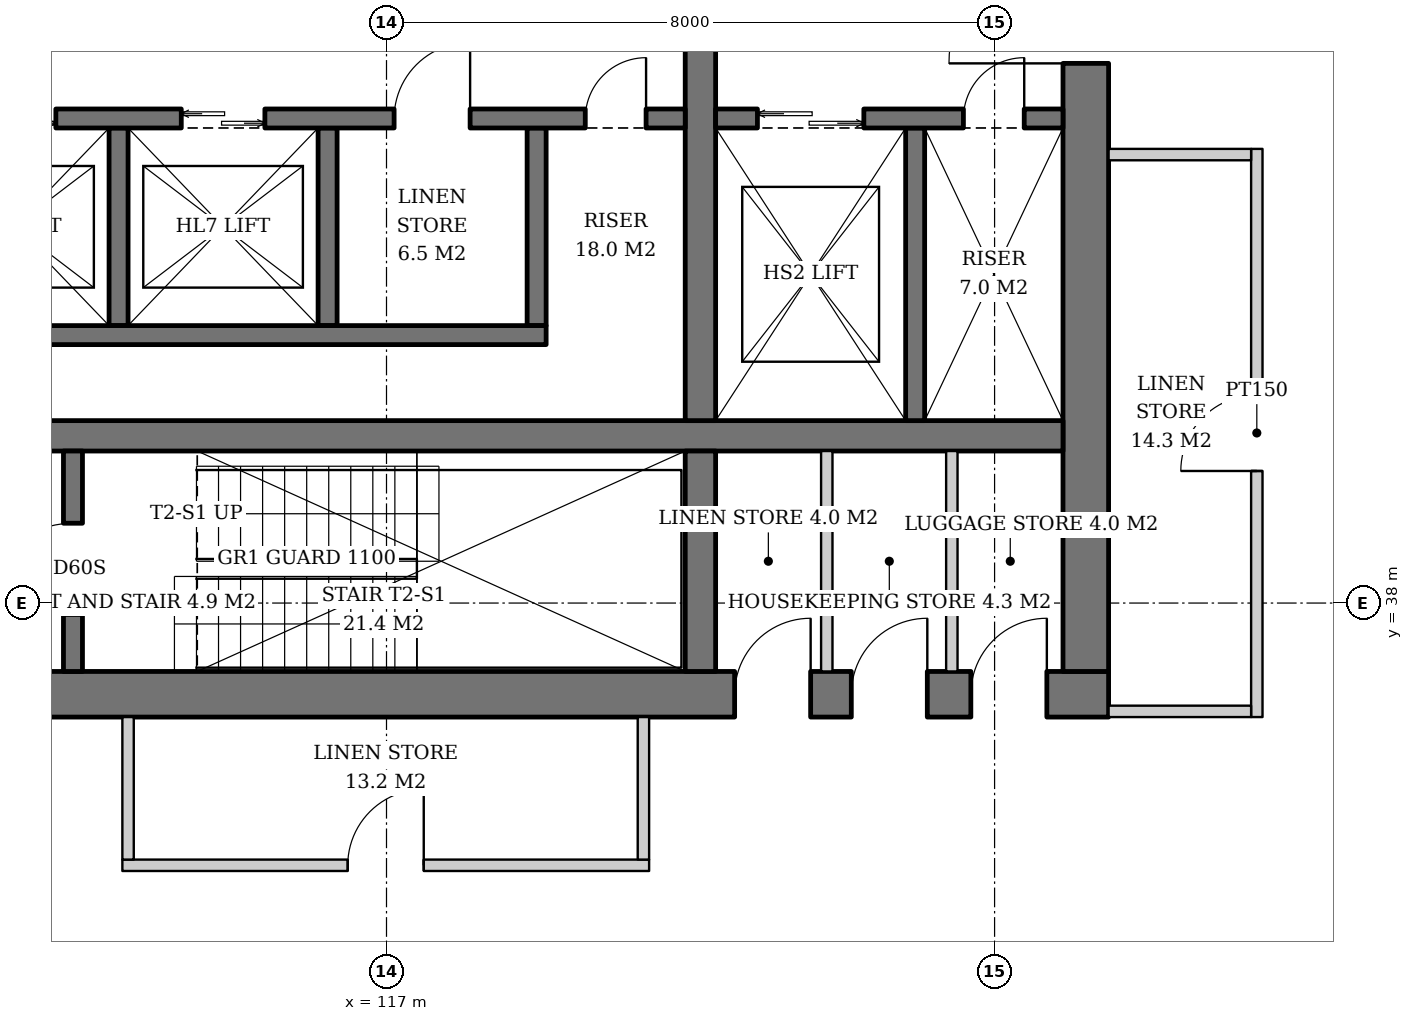
"""IFC4 building model, lengths in metres.
Left out: names, types, materials, properties, quantities, classifications, styles, units other than length and angle.
Written with IfcOpenShell. Run it as: python <this file> out.ifc"""

import sys

from ifc_helpers import new_model, si_unit, direction, frame, frame_2d, origin, place, context, subcontext, project, spatial, rectangle, extrude, element, fill, save


model = new_model("IFC4")
c1 = context("Model", 3, precision=1e-05, world=origin(), true_north=direction((0.0, 1.0)))
c2 = subcontext(c1, "Body", "Model", "MODEL_VIEW")
j1 = project(units=[si_unit("LENGTHUNIT", "METRE"), si_unit("PLANEANGLEUNIT", "RADIAN")], contexts=[c1])
p1 = place(None, origin())
s1 = spatial("IfcSite", under=j1, at=p1, CompositionType="ELEMENT")
p2 = place(p1, origin())
s2 = spatial("IfcBuilding", under=s1, at=p2, CompositionType="ELEMENT")
p3 = place(p2, frame((0.0, 0.0, 40.0)))
s3 = spatial("IfcBuildingStorey", under=s2, at=p3, CompositionType="ELEMENT", Elevation=40.0)
p4 = place(p3, frame((107.5, 36.8, 0.0), z_axis=(0.0, 0.0, 1.0), x_axis=(1.0, 0.0, 0.0)))
e1 = element("IfcWall", 1, at=p4, inside=s3, PredefinedType="SHEAR", context=c2, shape_type="SweptSolid", body=[
    extrude(rectangle(XDim=19.0, YDim=0.6, at=frame_2d((9.5, 0.0))), origin(), (0.0, 0.0, 1.0), 3.8),
])
p5 = place(p4, frame((3.9, 0.0, 0.0)))
e2 = element("IfcOpeningElement", 2, at=p5, cuts=e1, PredefinedType="OPENING", context=c2, shape_type="SweptSolid", body=[
    extrude(rectangle(XDim=1.0, YDim=2.1, at=frame_2d((0.5, 1.05))), frame((0.0, 0.31, 0.0), z_axis=(0.0, -1.0, 0.0), x_axis=(1.0, 0.0, 0.0)), (0.0, 0.0, 1.0), 0.62),
])
p6 = place(p4, frame((14.08, 0.0, 0.0)))
e3 = element("IfcOpeningElement", 3, at=p6, cuts=e1, PredefinedType="OPENING", context=c2, shape_type="SweptSolid", body=[
    extrude(rectangle(XDim=1.0, YDim=2.1, at=frame_2d((0.5, 1.05))), frame((0.0, 0.31, 0.0), z_axis=(0.0, -1.0, 0.0), x_axis=(1.0, 0.0, 0.0)), (0.0, 0.0, 1.0), 0.62),
])
p7 = place(p4, frame((15.615, 0.0, 0.0)))
e4 = element("IfcOpeningElement", 4, at=p7, cuts=e1, PredefinedType="OPENING", context=c2, shape_type="SweptSolid", body=[
    extrude(rectangle(XDim=1.0, YDim=2.1, at=frame_2d((0.5, 1.05))), frame((0.0, 0.31, 0.0), z_axis=(0.0, -1.0, 0.0), x_axis=(1.0, 0.0, 0.0)), (0.0, 0.0, 1.0), 0.62),
])
p8 = place(p4, frame((17.188, 0.0, 0.0)))
e5 = element("IfcOpeningElement", 5, at=p8, cuts=e1, PredefinedType="OPENING", context=c2, shape_type="SweptSolid", body=[
    extrude(rectangle(XDim=1.0, YDim=2.1, at=frame_2d((0.5, 1.05))), frame((0.0, 0.31, 0.0), z_axis=(0.0, -1.0, 0.0), x_axis=(1.0, 0.0, 0.0)), (0.0, 0.0, 1.0), 0.62),
])
p9 = place(p3, frame((126.2, 37.1, 0.0), z_axis=(0.0, 0.0, 1.0), x_axis=(0.0, 1.0, 0.0)))
e6 = element("IfcWall", 6, at=p9, inside=s3, PredefinedType="SHEAR", context=c2, shape_type="SweptSolid", body=[
    extrude(rectangle(XDim=17.8, YDim=0.6, at=frame_2d((8.9, 0.0))), origin(), (0.0, 0.0, 1.0), 3.8),
])
p10 = place(p9, frame((8.0, 0.0, 0.0)))
e7 = element("IfcOpeningElement", 7, at=p10, cuts=e6, PredefinedType="OPENING", context=c2, shape_type="SweptSolid", body=[
    extrude(rectangle(XDim=1.8, YDim=2.4, at=frame_2d((0.9, 1.2))), frame((0.0, 0.31, 0.0), z_axis=(0.0, -1.0, 0.0), x_axis=(1.0, 0.0, 0.0)), (0.0, 0.0, 1.0), 0.62),
])
p11 = place(p3, frame((108.1, 40.2, 0.0), z_axis=(0.0, 0.0, 1.0), x_axis=(1.0, 0.0, 0.0)))
e8 = element("IfcWall", 8, at=p11, inside=s3, PredefinedType="SHEAR", context=c2, shape_type="SweptSolid", body=[
    extrude(rectangle(XDim=17.8, YDim=0.4, at=frame_2d((8.9, 0.0))), origin(), (0.0, 0.0, 1.0), 3.8),
])
p12 = place(p3, frame((121.13, 37.1, 0.0), z_axis=(0.0, 0.0, 1.0), x_axis=(0.0, 1.0, 0.0)))
e9 = element("IfcWall", 9, at=p12, inside=s3, PredefinedType="SHEAR", context=c2, shape_type="SweptSolid", body=[
    extrude(rectangle(XDim=2.9, YDim=0.4, at=frame_2d((1.45, 0.0))), origin(), (0.0, 0.0, 1.0), 3.8),
])
p13 = place(p3, frame((121.13, 40.4, 0.0), z_axis=(0.0, 0.0, 1.0), x_axis=(0.0, 1.0, 0.0)))
e10 = element("IfcWall", 10, at=p13, inside=s3, PredefinedType="SHEAR", context=c2, shape_type="SweptSolid", body=[
    extrude(rectangle(XDim=11.2, YDim=0.4, at=frame_2d((5.6, 0.0))), origin(), (0.0, 0.0, 1.0), 3.8),
])
p14 = place(p3, frame((112.875, 37.1, 0.0), z_axis=(0.0, 0.0, 1.0), x_axis=(0.0, 1.0, 0.0)))
e11 = element("IfcWall", 11, at=p14, inside=s3, PredefinedType="SHEAR", context=c2, shape_type="SweptSolid", body=[
    extrude(rectangle(XDim=2.9, YDim=0.25, at=frame_2d((1.45, 0.0))), origin(), (0.0, 0.0, 1.0), 3.8),
])
p15 = place(p14, frame((0.75, 0.0, 0.0)))
e12 = element("IfcOpeningElement", 12, at=p15, cuts=e11, PredefinedType="OPENING", context=c2, shape_type="SweptSolid", body=[
    extrude(rectangle(XDim=1.2, YDim=2.1, at=frame_2d((0.6, 1.05))), frame((0.0, 0.135, 0.0), z_axis=(0.0, -1.0, 0.0), x_axis=(1.0, 0.0, 0.0)), (0.0, 0.0, 1.0), 0.27),
])
for number, where, z_axis, x_axis in (
    (13, (113.475, 44.25, 0.0), (0.0, 0.0, 1.0), (0.0, -1.0, 0.0)),
    (14, (116.225, 44.25, 0.0), (0.0, 0.0, 1.0), (0.0, -1.0, 0.0)),
    (15, (118.975, 44.25, 0.0), (0.0, 0.0, 1.0), (0.0, -1.0, 0.0)),
):
    element("IfcWall", number, at=place(p3, frame(where, z_axis=z_axis, x_axis=x_axis)), inside=s3, PredefinedType="SHEAR", context=c2, shape_type="SweptSolid", body=[
        extrude(rectangle(XDim=2.6, YDim=0.25, at=frame_2d((1.3, 0.0))), origin(), (0.0, 0.0, 1.0), 3.8),
    ])
p16 = place(p3, frame((108.1, 41.525, 0.0), z_axis=(0.0, 0.0, 1.0), x_axis=(1.0, 0.0, 0.0)))
e16 = element("IfcWall", 16, at=p16, inside=s3, PredefinedType="SHEAR", context=c2, shape_type="SweptSolid", body=[
    extrude(rectangle(XDim=11.0, YDim=0.25, at=frame_2d((5.5, 0.0))), origin(), (0.0, 0.0, 1.0), 3.8),
])
p17 = place(p3, frame((108.1, 44.375, 0.0), z_axis=(0.0, 0.0, 1.0), x_axis=(1.0, 0.0, 0.0)))
e17 = element("IfcWall", 17, at=p17, inside=s3, PredefinedType="SHEAR", context=c2, shape_type="SweptSolid", body=[
    extrude(rectangle(XDim=12.83, YDim=0.25, at=frame_2d((6.415, 0.0))), origin(), (0.0, 0.0, 1.0), 3.8),
])
p18 = place(p17, frame((0.7, 0.0, 0.0)))
e18 = element("IfcOpeningElement", 18, at=p18, cuts=e17, PredefinedType="OPENING", context=c2, shape_type="SweptSolid", body=[
    extrude(rectangle(XDim=1.1, YDim=2.2, at=frame_2d((0.55, 1.1))), frame((0.0, 0.135, 0.0), z_axis=(0.0, -1.0, 0.0), x_axis=(1.0, 0.0, 0.0)), (0.0, 0.0, 1.0), 0.27),
])
p19 = place(p17, frame((3.45, 0.0, 0.0)))
e19 = element("IfcOpeningElement", 19, at=p19, cuts=e17, PredefinedType="OPENING", context=c2, shape_type="SweptSolid", body=[
    extrude(rectangle(XDim=1.1, YDim=2.2, at=frame_2d((0.55, 1.1))), frame((0.0, 0.135, 0.0), z_axis=(0.0, -1.0, 0.0), x_axis=(1.0, 0.0, 0.0)), (0.0, 0.0, 1.0), 0.27),
])
p20 = place(p17, frame((6.2, 0.0, 0.0)))
e20 = element("IfcOpeningElement", 20, at=p20, cuts=e17, PredefinedType="OPENING", context=c2, shape_type="SweptSolid", body=[
    extrude(rectangle(XDim=1.1, YDim=2.2, at=frame_2d((0.55, 1.1))), frame((0.0, 0.135, 0.0), z_axis=(0.0, -1.0, 0.0), x_axis=(1.0, 0.0, 0.0)), (0.0, 0.0, 1.0), 0.27),
])
p21 = place(p17, frame((9.0, 0.0, 0.0)))
e21 = element("IfcOpeningElement", 21, at=p21, cuts=e17, PredefinedType="OPENING", context=c2, shape_type="SweptSolid", body=[
    extrude(rectangle(XDim=1.0, YDim=2.1, at=frame_2d((0.5, 1.05))), frame((0.0, 0.135, 0.0), z_axis=(0.0, -1.0, 0.0), x_axis=(1.0, 0.0, 0.0)), (0.0, 0.0, 1.0), 0.27),
])
p22 = place(p17, frame((11.515, 0.0, 0.0)))
e22 = element("IfcOpeningElement", 22, at=p22, cuts=e17, PredefinedType="OPENING", context=c2, shape_type="SweptSolid", body=[
    extrude(rectangle(XDim=0.8, YDim=2.0, at=frame_2d((0.4, 1.0))), frame((0.0, 0.135, 0.0), z_axis=(0.0, -1.0, 0.0), x_axis=(1.0, 0.0, 0.0)), (0.0, 0.0, 1.0), 0.27),
])
p23 = place(p3, frame((123.955, 44.25, 0.0), z_axis=(0.0, 0.0, 1.0), x_axis=(0.0, -1.0, 0.0)))
e23 = element("IfcWall", 23, at=p23, inside=s3, PredefinedType="SHEAR", context=c2, shape_type="SweptSolid", body=[
    extrude(rectangle(XDim=3.85, YDim=0.25, at=frame_2d((1.925, 0.0))), origin(), (0.0, 0.0, 1.0), 3.8),
])
p24 = place(p3, frame((121.33, 44.375, 0.0), z_axis=(0.0, 0.0, 1.0), x_axis=(1.0, 0.0, 0.0)))
e24 = element("IfcWall", 24, at=p24, inside=s3, PredefinedType="SHEAR", context=c2, shape_type="SweptSolid", body=[
    extrude(rectangle(XDim=4.57, YDim=0.25, at=frame_2d((2.285, 0.0))), origin(), (0.0, 0.0, 1.0), 3.8),
])
p25 = place(p24, frame((0.55, 0.0, 0.0)))
e25 = element("IfcOpeningElement", 25, at=p25, cuts=e24, PredefinedType="OPENING", context=c2, shape_type="SweptSolid", body=[
    extrude(rectangle(XDim=1.4, YDim=2.4, at=frame_2d((0.7, 1.2))), frame((0.0, 0.135, 0.0), z_axis=(0.0, -1.0, 0.0), x_axis=(1.0, 0.0, 0.0)), (0.0, 0.0, 1.0), 0.27),
])
p26 = place(p24, frame((3.26, 0.0, 0.0)))
e26 = element("IfcOpeningElement", 26, at=p26, cuts=e24, PredefinedType="OPENING", context=c2, shape_type="SweptSolid", body=[
    extrude(rectangle(XDim=0.8, YDim=2.0, at=frame_2d((0.4, 1.0))), frame((0.0, 0.135, 0.0), z_axis=(0.0, -1.0, 0.0), x_axis=(1.0, 0.0, 0.0)), (0.0, 0.0, 1.0), 0.27),
])
for number, where, z_axis, x_axis in (
    (27, (122.792, 37.1, 0.0), (0.0, 0.0, 1.0), (0.0, 1.0, 0.0)),
    (28, (124.438, 37.1, 0.0), (0.0, 0.0, 1.0), (0.0, 1.0, 0.0)),
):
    element("IfcWall", number, at=place(p3, frame(where, z_axis=z_axis, x_axis=x_axis)), inside=s3, PredefinedType="SOLIDWALL", context=c2, shape_type="SweptSolid", body=[
        extrude(rectangle(XDim=2.9, YDim=0.15, at=frame_2d((1.45, 0.0))), origin(), (0.0, 0.0, 1.0), 3.6),
    ])
p27 = place(p3, frame((128.45, 36.5, 0.0), z_axis=(0.0, 0.0, 1.0), x_axis=(0.0, 1.0, 0.0)))
e29 = element("IfcWall", 29, at=p27, inside=s3, PredefinedType="PARTITIONING", context=c2, shape_type="SweptSolid", body=[
    extrude(rectangle(XDim=7.475, YDim=0.15, at=frame_2d((3.738, 0.0))), origin(), (0.0, 0.0, 1.0), 2.8),
])
p28 = place(p27, frame((3.238, 0.0, 0.0)))
e30 = element("IfcOpeningElement", 30, at=p28, cuts=e29, PredefinedType="OPENING", context=c2, shape_type="SweptSolid", body=[
    extrude(rectangle(XDim=1.0, YDim=2.1, at=frame_2d((0.5, 1.05))), frame((0.0, 0.085, 0.0), z_axis=(0.0, -1.0, 0.0), x_axis=(1.0, 0.0, 0.0)), (0.0, 0.0, 1.0), 0.17),
])
p29 = place(p3, frame((126.5, 36.575, 0.0), z_axis=(0.0, 0.0, 1.0), x_axis=(1.0, 0.0, 0.0)))
e31 = element("IfcWall", 31, at=p29, inside=s3, PredefinedType="PARTITIONING", context=c2, shape_type="SweptSolid", body=[
    extrude(rectangle(XDim=1.875, YDim=0.15, at=frame_2d((0.938, 0.0))), origin(), (0.0, 0.0, 1.0), 2.8),
])
p30 = place(p3, frame((126.5, 43.9, 0.0), z_axis=(0.0, 0.0, 1.0), x_axis=(1.0, 0.0, 0.0)))
e32 = element("IfcWall", 32, at=p30, inside=s3, PredefinedType="PARTITIONING", context=c2, shape_type="SweptSolid", body=[
    extrude(rectangle(XDim=1.875, YDim=0.15, at=frame_2d((0.938, 0.0))), origin(), (0.0, 0.0, 1.0), 3.6),
])
p31 = place(p3, frame((113.525, 34.55, 0.0), z_axis=(0.0, 0.0, 1.0), x_axis=(1.0, 0.0, 0.0)))
e33 = element("IfcWall", 33, at=p31, inside=s3, PredefinedType="PARTITIONING", context=c2, shape_type="SweptSolid", body=[
    extrude(rectangle(XDim=6.93, YDim=0.15, at=frame_2d((3.465, 0.0))), origin(), (0.0, 0.0, 1.0), 2.847),
])
p32 = place(p31, frame((2.965, 0.0, 0.0)))
e34 = element("IfcOpeningElement", 34, at=p32, cuts=e33, PredefinedType="OPENING", context=c2, shape_type="SweptSolid", body=[
    extrude(rectangle(XDim=1.0, YDim=2.1, at=frame_2d((0.5, 1.05))), frame((0.0, 0.085, 0.0), z_axis=(0.0, -1.0, 0.0), x_axis=(1.0, 0.0, 0.0)), (0.0, 0.0, 1.0), 0.17),
])
for number, where, z_axis, x_axis in (
    (35, (113.6, 36.5, 0.0), (0.0, 0.0, 1.0), (0.0, -1.0, 0.0)),
    (36, (120.38, 36.5, 0.0), (0.0, 0.0, 1.0), (0.0, -1.0, 0.0)),
):
    element("IfcWall", number, at=place(p3, frame(where, z_axis=z_axis, x_axis=x_axis)), inside=s3, PredefinedType="PARTITIONING", context=c2, shape_type="SweptSolid", body=[
        extrude(rectangle(XDim=1.875, YDim=0.15, at=frame_2d((0.938, 0.0))), origin(), (0.0, 0.0, 1.0), 3.6),
    ])
p33 = place(p15, origin())
e37 = element("IfcDoor", 37, at=p33, inside=s3, OperationType="SINGLE_SWING_LEFT", PredefinedType="DOOR", context=c2, shape_type="SweptSolid", body=[
    extrude(rectangle(XDim=1.2, YDim=2.1, at=frame_2d((0.6, 1.05))), frame((0.0, 0.025, 0.0), z_axis=(0.0, -1.0, 0.0), x_axis=(1.0, 0.0, 0.0)), (0.0, 0.0, 1.0), 0.05),
])
fill(e12, e37)
p34 = place(p19, origin())
e38 = element("IfcDoor", 38, at=p34, inside=s3, OperationType="DOUBLE_DOOR_SLIDING", PredefinedType="DOOR", context=c2, shape_type="SweptSolid", body=[
    extrude(rectangle(XDim=1.1, YDim=2.2, at=frame_2d((0.55, 1.1))), frame((0.0, 0.025, 0.0), z_axis=(0.0, -1.0, 0.0), x_axis=(1.0, 0.0, 0.0)), (0.0, 0.0, 1.0), 0.05),
])
fill(e19, e38)
p35 = place(p20, origin())
e39 = element("IfcDoor", 39, at=p35, inside=s3, OperationType="DOUBLE_DOOR_SLIDING", PredefinedType="DOOR", context=c2, shape_type="SweptSolid", body=[
    extrude(rectangle(XDim=1.1, YDim=2.2, at=frame_2d((0.55, 1.1))), frame((0.0, 0.025, 0.0), z_axis=(0.0, -1.0, 0.0), x_axis=(1.0, 0.0, 0.0)), (0.0, 0.0, 1.0), 0.05),
])
fill(e20, e39)
p36 = place(p21, origin())
e40 = element("IfcDoor", 40, at=p36, inside=s3, OperationType="SINGLE_SWING_RIGHT", PredefinedType="DOOR", context=c2, shape_type="SweptSolid", body=[
    extrude(rectangle(XDim=1.0, YDim=2.1, at=frame_2d((0.5, 1.05))), frame((0.0, 0.025, 0.0), z_axis=(0.0, -1.0, 0.0), x_axis=(1.0, 0.0, 0.0)), (0.0, 0.0, 1.0), 0.05),
])
fill(e21, e40)
p37 = place(p22, origin())
e41 = element("IfcDoor", 41, at=p37, inside=s3, OperationType="SINGLE_SWING_RIGHT", PredefinedType="DOOR", context=c2, shape_type="SweptSolid", body=[
    extrude(rectangle(XDim=0.8, YDim=2.0, at=frame_2d((0.4, 1.0))), frame((0.0, 0.025, 0.0), z_axis=(0.0, -1.0, 0.0), x_axis=(1.0, 0.0, 0.0)), (0.0, 0.0, 1.0), 0.05),
])
fill(e22, e41)
p38 = place(p25, origin())
e42 = element("IfcDoor", 42, at=p38, inside=s3, OperationType="DOUBLE_DOOR_SLIDING", PredefinedType="DOOR", context=c2, shape_type="SweptSolid", body=[
    extrude(rectangle(XDim=1.4, YDim=2.4, at=frame_2d((0.7, 1.2))), frame((0.0, 0.025, 0.0), z_axis=(0.0, -1.0, 0.0), x_axis=(1.0, 0.0, 0.0)), (0.0, 0.0, 1.0), 0.05),
])
fill(e25, e42)
p39 = place(p26, origin())
e43 = element("IfcDoor", 43, at=p39, inside=s3, OperationType="SINGLE_SWING_RIGHT", PredefinedType="DOOR", context=c2, shape_type="SweptSolid", body=[
    extrude(rectangle(XDim=0.8, YDim=2.0, at=frame_2d((0.4, 1.0))), frame((0.0, 0.025, 0.0), z_axis=(0.0, -1.0, 0.0), x_axis=(1.0, 0.0, 0.0)), (0.0, 0.0, 1.0), 0.05),
])
fill(e26, e43)
p40 = place(p10, origin())
e44 = element("IfcDoor", 44, at=p40, inside=s3, OperationType="DOUBLE_DOOR_SINGLE_SWING", PredefinedType="DOOR", context=c2, shape_type="SweptSolid", body=[
    extrude(rectangle(XDim=1.8, YDim=2.4, at=frame_2d((0.9, 1.2))), frame((0.0, 0.025, 0.0), z_axis=(0.0, -1.0, 0.0), x_axis=(1.0, 0.0, 0.0)), (0.0, 0.0, 1.0), 0.05),
])
fill(e7, e44)
p41 = place(p6, origin())
e45 = element("IfcDoor", 45, at=p41, inside=s3, OperationType="SINGLE_SWING_RIGHT", PredefinedType="DOOR", context=c2, shape_type="SweptSolid", body=[
    extrude(rectangle(XDim=1.0, YDim=2.1, at=frame_2d((0.5, 1.05))), frame((0.0, 0.29, 0.0), z_axis=(0.0, -1.0, 0.0), x_axis=(1.0, 0.0, 0.0)), (0.0, 0.0, 1.0), 0.05),
])
fill(e3, e45)
p42 = place(p7, origin())
e46 = element("IfcDoor", 46, at=p42, inside=s3, OperationType="SINGLE_SWING_RIGHT", PredefinedType="DOOR", context=c2, shape_type="SweptSolid", body=[
    extrude(rectangle(XDim=1.0, YDim=2.1, at=frame_2d((0.5, 1.05))), frame((0.0, 0.29, 0.0), z_axis=(0.0, -1.0, 0.0), x_axis=(1.0, 0.0, 0.0)), (0.0, 0.0, 1.0), 0.05),
])
fill(e4, e46)
p43 = place(p8, origin())
e47 = element("IfcDoor", 47, at=p43, inside=s3, OperationType="SINGLE_SWING_RIGHT", PredefinedType="DOOR", context=c2, shape_type="SweptSolid", body=[
    extrude(rectangle(XDim=1.0, YDim=2.1, at=frame_2d((0.5, 1.05))), frame((0.0, 0.29, 0.0), z_axis=(0.0, -1.0, 0.0), x_axis=(1.0, 0.0, 0.0)), (0.0, 0.0, 1.0), 0.05),
])
fill(e5, e47)
p44 = place(p28, origin())
e48 = element("IfcDoor", 48, at=p44, inside=s3, OperationType="SINGLE_SWING_LEFT", PredefinedType="DOOR", context=c2, shape_type="SweptSolid", body=[
    extrude(rectangle(XDim=1.0, YDim=2.1, at=frame_2d((0.5, 1.05))), frame((0.0, 0.025, 0.0), z_axis=(0.0, -1.0, 0.0), x_axis=(1.0, 0.0, 0.0)), (0.0, 0.0, 1.0), 0.05),
])
fill(e30, e48)
p45 = place(p32, origin())
e49 = element("IfcDoor", 49, at=p45, inside=s3, OperationType="SINGLE_SWING_RIGHT", PredefinedType="DOOR", context=c2, shape_type="SweptSolid", body=[
    extrude(rectangle(XDim=1.0, YDim=2.1, at=frame_2d((0.5, 1.05))), frame((0.0, 0.025, 0.0), z_axis=(0.0, -1.0, 0.0), x_axis=(1.0, 0.0, 0.0)), (0.0, 0.0, 1.0), 0.05),
])
fill(e34, e49)
save(model, sys.argv[1])
